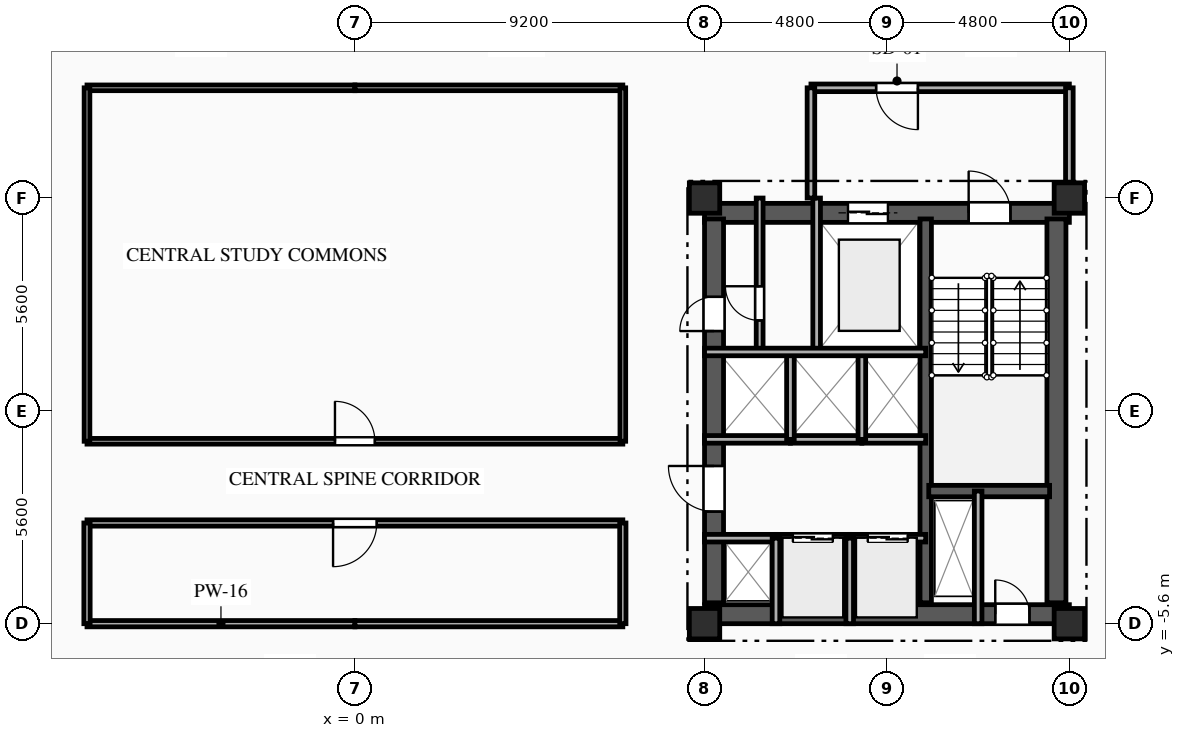
"""IFC4 building model, lengths in metres.
Left out: names, types, materials, properties, quantities, classifications, styles, units other than length and angle.
Written with IfcOpenShell. Run it as: python <this file> out.ifc"""

import sys

from ifc_helpers import new_model, si_unit, direction, frame, frame_2d, origin, origin_2d, place, context, subcontext, project, spatial, rectangle, extrude, element, fill, save


model = new_model("IFC4")
c1 = context("Model", 3, precision=1e-05, world=origin(), true_north=direction((0.0, 1.0)))
c2 = subcontext(c1, "Body", "Model", "MODEL_VIEW")
j1 = project(units=[si_unit("LENGTHUNIT", "METRE"), si_unit("PLANEANGLEUNIT", "RADIAN")], contexts=[c1])
p1 = place(None, origin())
s1 = spatial("IfcSite", under=j1, at=p1, CompositionType="ELEMENT")
p2 = place(p1, origin())
s2 = spatial("IfcBuilding", under=s1, at=p2, CompositionType="ELEMENT")
p3 = place(p2, frame((0.0, 0.0, 203.1)))
s3 = spatial("IfcBuildingStorey", under=s2, at=p3, CompositionType="ELEMENT", Elevation=203.1)
for number, where, z_axis, x_axis in (
    (1, (9.2, -5.6, 0.0), (0.0, 0.0, 1.0), (1.0, 0.0, 0.0)),
    (2, (9.2, 5.6, 0.0), (0.0, 0.0, 1.0), (1.0, 0.0, 0.0)),
    (3, (18.8, -5.6, 0.0), (0.0, 0.0, 1.0), (1.0, 0.0, 0.0)),
    (4, (18.8, 5.6, 0.0), (0.0, 0.0, 1.0), (1.0, 0.0, 0.0)),
):
    element("IfcColumn", number, at=place(p3, frame(where, z_axis=z_axis, x_axis=x_axis)), inside=s3, PredefinedType="COLUMN", context=c2, shape_type="SweptSolid", body=[
        extrude(rectangle(XDim=0.8, YDim=0.8, at=origin_2d()), origin(), (0.0, 0.0, 1.0), 3.35),
    ])
p4 = place(p3, frame((9.2, 5.21, 0.0), z_axis=(0.0, 0.0, 1.0), x_axis=(1.0, 0.0, 0.0)))
e5 = element("IfcWall", 5, at=p4, inside=s3, PredefinedType="SHEAR", context=c2, shape_type="SweptSolid", body=[
    extrude(rectangle(XDim=9.6, YDim=0.5, at=frame_2d((4.8, 0.0))), origin(), (0.0, 0.0, 1.0), 3.04),
])
p5 = place(p4, frame((6.95, 0.0, 0.0)))
e6 = element("IfcOpeningElement", 6, at=p5, cuts=e5, PredefinedType="OPENING", context=c2, shape_type="SweptSolid", body=[
    extrude(rectangle(XDim=1.1, YDim=2.15, at=frame_2d((0.55, 1.075))), frame((0.0, 0.26, 0.0), z_axis=(0.0, -1.0, 0.0), x_axis=(1.0, 0.0, 0.0)), (0.0, 0.0, 1.0), 0.52),
])
p6 = place(p4, frame((3.775, 0.0, 0.0)))
e7 = element("IfcOpeningElement", 7, at=p6, cuts=e5, PredefinedType="OPENING", context=c2, shape_type="SweptSolid", body=[
    extrude(rectangle(XDim=1.05, YDim=2.1, at=frame_2d((0.525, 1.05))), frame((0.0, 0.26, 0.0), z_axis=(0.0, -1.0, 0.0), x_axis=(1.0, 0.0, 0.0)), (0.0, 0.0, 1.0), 0.52),
])
p7 = place(p3, frame((9.2, -5.35, 0.0), z_axis=(0.0, 0.0, 1.0), x_axis=(1.0, 0.0, 0.0)))
e8 = element("IfcWall", 8, at=p7, inside=s3, PredefinedType="SHEAR", context=c2, shape_type="SweptSolid", body=[
    extrude(rectangle(XDim=9.6, YDim=0.5, at=frame_2d((4.8, 0.0))), origin(), (0.0, 0.0, 1.0), 3.04),
])
p8 = place(p7, frame((7.65, 0.0, 0.0)))
e9 = element("IfcOpeningElement", 9, at=p8, cuts=e8, PredefinedType="OPENING", context=c2, shape_type="SweptSolid", body=[
    extrude(rectangle(XDim=0.9, YDim=2.1, at=frame_2d((0.45, 1.05))), frame((0.0, 0.26, 0.0), z_axis=(0.0, -1.0, 0.0), x_axis=(1.0, 0.0, 0.0)), (0.0, 0.0, 1.0), 0.52),
])
p9 = place(p3, frame((9.45, -5.05, 0.0), z_axis=(0.0, 0.0, 1.0), x_axis=(0.0, 1.0, 0.0)))
e10 = element("IfcWall", 10, at=p9, inside=s3, PredefinedType="SHEAR", context=c2, shape_type="SweptSolid", body=[
    extrude(rectangle(XDim=10.1, YDim=0.5, at=frame_2d((5.05, 0.0))), origin(), (0.0, 0.0, 1.0), 3.04),
])
p10 = place(p9, frame((7.15, 0.0, 0.0)))
e11 = element("IfcOpeningElement", 11, at=p10, cuts=e10, PredefinedType="OPENING", context=c2, shape_type="SweptSolid", body=[
    extrude(rectangle(XDim=0.9, YDim=2.1, at=frame_2d((0.45, 1.05))), frame((0.0, 0.26, 0.0), z_axis=(0.0, -1.0, 0.0), x_axis=(1.0, 0.0, 0.0)), (0.0, 0.0, 1.0), 0.52),
])
p11 = place(p9, frame((2.4, 0.0, 0.0)))
e12 = element("IfcOpeningElement", 12, at=p11, cuts=e10, PredefinedType="OPENING", context=c2, shape_type="SweptSolid", body=[
    extrude(rectangle(XDim=1.2, YDim=2.15, at=frame_2d((0.6, 1.075))), frame((0.0, 0.26, 0.0), z_axis=(0.0, -1.0, 0.0), x_axis=(1.0, 0.0, 0.0)), (0.0, 0.0, 1.0), 0.52),
])
p12 = place(p3, frame((18.46, -5.05, 0.0), z_axis=(0.0, 0.0, 1.0), x_axis=(0.0, 1.0, 0.0)))
e13 = element("IfcWall", 13, at=p12, inside=s3, PredefinedType="SHEAR", context=c2, shape_type="SweptSolid", body=[
    extrude(rectangle(XDim=10.1, YDim=0.5, at=frame_2d((5.05, 0.0))), origin(), (0.0, 0.0, 1.0), 3.04),
])
p13 = place(p3, frame((15.02, -5.05, 0.0), z_axis=(0.0, 0.0, 1.0), x_axis=(0.0, 1.0, 0.0)))
e14 = element("IfcWall", 14, at=p13, inside=s3, PredefinedType="SHEAR", context=c2, shape_type="SweptSolid", body=[
    extrude(rectangle(XDim=10.1, YDim=0.3, at=frame_2d((5.05, 0.0))), origin(), (0.0, 0.0, 1.0), 3.04),
])
p14 = place(p3, frame((15.1, -2.11, 0.0), z_axis=(0.0, 0.0, 1.0), x_axis=(1.0, 0.0, 0.0)))
e15 = element("IfcWall", 15, at=p14, inside=s3, PredefinedType="SHEAR", context=c2, shape_type="SweptSolid", body=[
    extrude(rectangle(XDim=3.18, YDim=0.3, at=frame_2d((1.59, 0.0))), origin(), (0.0, 0.0, 1.0), 3.04),
])
p15 = place(p3, frame((16.4, -2.11, 0.0), z_axis=(0.0, 0.0, 1.0), x_axis=(0.0, -1.0, 0.0)))
e16 = element("IfcWall", 16, at=p15, inside=s3, PredefinedType="PARTITIONING", context=c2, shape_type="SweptSolid", body=[
    extrude(rectangle(XDim=3.49, YDim=0.2, at=frame_2d((1.745, 0.0))), origin(), (0.0, 0.0, 1.0), 3.04),
])
p16 = place(p3, frame((12.15, 5.6, 0.0), z_axis=(0.0, 0.0, 1.0), x_axis=(0.0, -1.0, 0.0)))
e17 = element("IfcWall", 17, at=p16, inside=s3, PredefinedType="PARTITIONING", context=c2, shape_type="SweptSolid", body=[
    extrude(rectangle(XDim=4.05, YDim=0.2, at=frame_2d((2.025, 0.0))), origin(), (0.0, 0.0, 1.0), 3.04),
])
p17 = place(p3, frame((18.8, 8.5, 0.0), z_axis=(0.0, 0.0, 1.0), x_axis=(-1.0, 0.0, 0.0)))
e18 = element("IfcWall", 18, at=p17, inside=s3, PredefinedType="PARTITIONING", context=c2, shape_type="SweptSolid", body=[
    extrude(rectangle(XDim=6.8, YDim=0.2, at=frame_2d((3.4, 0.0))), origin(), (0.0, 0.0, 1.0), 3.04),
])
p18 = place(p17, frame((3.985, 0.0, 0.0)))
e19 = element("IfcOpeningElement", 19, at=p18, cuts=e18, PredefinedType="OPENING", context=c2, shape_type="SweptSolid", body=[
    extrude(rectangle(XDim=1.1, YDim=2.15, at=frame_2d((0.55, 1.075))), frame((0.0, 0.11, 0.0), z_axis=(0.0, -1.0, 0.0), x_axis=(1.0, 0.0, 0.0)), (0.0, 0.0, 1.0), 0.22),
])
p19 = place(p3, frame((18.8, 5.6, 0.0), z_axis=(0.0, 0.0, 1.0), x_axis=(0.0, 1.0, 0.0)))
e20 = element("IfcWall", 20, at=p19, inside=s3, PredefinedType="PARTITIONING", context=c2, shape_type="SweptSolid", body=[
    extrude(rectangle(XDim=2.9, YDim=0.2, at=frame_2d((1.45, 0.0))), origin(), (0.0, 0.0, 1.0), 2.665),
])
p20 = place(p3, frame((12.0, 8.5, 0.0), z_axis=(0.0, 0.0, 1.0), x_axis=(0.0, -1.0, 0.0)))
e21 = element("IfcWall", 21, at=p20, inside=s3, PredefinedType="PARTITIONING", context=c2, shape_type="SweptSolid", body=[
    extrude(rectangle(XDim=2.9, YDim=0.2, at=frame_2d((1.45, 0.0))), origin(), (0.0, 0.0, 1.0), 3.04),
])
p21 = place(p3, frame((10.65, 1.55, 0.0), z_axis=(0.0, 0.0, 1.0), x_axis=(0.0, 1.0, 0.0)))
e22 = element("IfcWall", 22, at=p21, inside=s3, PredefinedType="PARTITIONING", context=c2, shape_type="SweptSolid", body=[
    extrude(rectangle(XDim=4.05, YDim=0.18, at=frame_2d((2.025, 0.0))), origin(), (0.0, 0.0, 1.0), 3.04),
])
p22 = place(p21, frame((0.829, 0.0, 0.0)))
e23 = element("IfcOpeningElement", 23, at=p22, cuts=e22, PredefinedType="OPENING", context=c2, shape_type="SweptSolid", body=[
    extrude(rectangle(XDim=0.9, YDim=2.1, at=frame_2d((0.45, 1.05))), frame((0.0, 0.1, 0.0), z_axis=(0.0, -1.0, 0.0), x_axis=(1.0, 0.0, 0.0)), (0.0, 0.0, 1.0), 0.2),
])
p23 = place(p3, frame((9.2, -3.35, 0.0), z_axis=(0.0, 0.0, 1.0), x_axis=(1.0, 0.0, 0.0)))
e24 = element("IfcWall", 24, at=p23, inside=s3, PredefinedType="PARTITIONING", context=c2, shape_type="SweptSolid", body=[
    extrude(rectangle(XDim=1.88, YDim=0.2, at=frame_2d((0.94, 0.0))), origin(), (0.0, 0.0, 1.0), 2.755),
])
p24 = place(p3, frame((11.08, -3.35, 0.0), z_axis=(0.0, 0.0, 1.0), x_axis=(1.0, 0.0, 0.0)))
e25 = element("IfcWall", 25, at=p24, inside=s3, PredefinedType="PARTITIONING", context=c2, shape_type="SweptSolid", body=[
    extrude(rectangle(XDim=1.94, YDim=0.2, at=frame_2d((0.97, 0.0))), origin(), (0.0, 0.0, 1.0), 3.04),
])
p25 = place(p24, frame((0.445, 0.0, 0.0)))
e26 = element("IfcOpeningElement", 26, at=p25, cuts=e25, PredefinedType="OPENING", context=c2, shape_type="SweptSolid", body=[
    extrude(rectangle(XDim=1.05, YDim=2.1, at=frame_2d((0.525, 1.05))), frame((0.0, 0.11, 0.0), z_axis=(0.0, -1.0, 0.0), x_axis=(1.0, 0.0, 0.0)), (0.0, 0.0, 1.0), 0.22),
])
p26 = place(p3, frame((13.02, -3.35, 0.0), z_axis=(0.0, 0.0, 1.0), x_axis=(1.0, 0.0, 0.0)))
e27 = element("IfcWall", 27, at=p26, inside=s3, PredefinedType="PARTITIONING", context=c2, shape_type="SweptSolid", body=[
    extrude(rectangle(XDim=2.0, YDim=0.2, at=frame_2d((1.0, 0.0))), origin(), (0.0, 0.0, 1.0), 3.04),
])
p27 = place(p26, frame((0.475, 0.0, 0.0)))
e28 = element("IfcOpeningElement", 28, at=p27, cuts=e27, PredefinedType="OPENING", context=c2, shape_type="SweptSolid", body=[
    extrude(rectangle(XDim=1.05, YDim=2.1, at=frame_2d((0.525, 1.05))), frame((0.0, 0.11, 0.0), z_axis=(0.0, -1.0, 0.0), x_axis=(1.0, 0.0, 0.0)), (0.0, 0.0, 1.0), 0.22),
])
p28 = place(p3, frame((11.46, -0.75, 0.0), z_axis=(0.0, 0.0, 1.0), x_axis=(-1.0, 0.0, 0.0)))
e29 = element("IfcWall", 29, at=p28, inside=s3, PredefinedType="PARTITIONING", context=c2, shape_type="SweptSolid", body=[
    extrude(rectangle(XDim=2.26, YDim=0.2, at=frame_2d((1.13, 0.0))), origin(), (0.0, 0.0, 1.0), 3.04),
])
p29 = place(p3, frame((13.34, -0.75, 0.0), z_axis=(0.0, 0.0, 1.0), x_axis=(-1.0, 0.0, 0.0)))
e30 = element("IfcWall", 30, at=p29, inside=s3, PredefinedType="PARTITIONING", context=c2, shape_type="SweptSolid", body=[
    extrude(rectangle(XDim=1.88, YDim=0.2, at=frame_2d((0.94, 0.0))), origin(), (0.0, 0.0, 1.0), 3.04),
])
p30 = place(p3, frame((15.02, -0.75, 0.0), z_axis=(0.0, 0.0, 1.0), x_axis=(-1.0, 0.0, 0.0)))
e31 = element("IfcWall", 31, at=p30, inside=s3, PredefinedType="PARTITIONING", context=c2, shape_type="SweptSolid", body=[
    extrude(rectangle(XDim=1.68, YDim=0.2, at=frame_2d((0.84, 0.0))), origin(), (0.0, 0.0, 1.0), 3.04),
])
for number, where, z_axis, x_axis in (
    (32, (11.08, -5.6, 0.0), (0.0, 0.0, 1.0), (0.0, 1.0, 0.0)),
    (33, (13.02, -5.6, 0.0), (0.0, 0.0, 1.0), (0.0, 1.0, 0.0)),
):
    element("IfcWall", number, at=place(p3, frame(where, z_axis=z_axis, x_axis=x_axis)), inside=s3, PredefinedType="PARTITIONING", context=c2, shape_type="SweptSolid", body=[
        extrude(rectangle(XDim=2.25, YDim=0.2, at=frame_2d((1.125, 0.0))), origin(), (0.0, 0.0, 1.0), 3.04),
    ])
for number, where, z_axis, x_axis in (
    (34, (11.46, -0.75, 0.0), (0.0, 0.0, 1.0), (0.0, 1.0, 0.0)),
    (35, (13.34, -0.75, 0.0), (0.0, 0.0, 1.0), (0.0, 1.0, 0.0)),
):
    element("IfcWall", number, at=place(p3, frame(where, z_axis=z_axis, x_axis=x_axis)), inside=s3, PredefinedType="PARTITIONING", context=c2, shape_type="SweptSolid", body=[
        extrude(rectangle(XDim=2.3, YDim=0.2, at=frame_2d((1.15, 0.0))), origin(), (0.0, 0.0, 1.0), 3.04),
    ])
for number, where, z_axis, x_axis in (
    (36, (0.0, 8.5, 0.0), (0.0, 0.0, 1.0), (-1.0, 0.0, 0.0)),
    (37, (7.05, 8.5, 0.0), (0.0, 0.0, 1.0), (-1.0, 0.0, 0.0)),
):
    element("IfcWall", number, at=place(p3, frame(where, z_axis=z_axis, x_axis=x_axis)), inside=s3, PredefinedType="PARTITIONING", context=c2, shape_type="SweptSolid", body=[
        extrude(rectangle(XDim=7.05, YDim=0.15, at=frame_2d((3.525, 0.0))), origin(), (0.0, 0.0, 1.0), 3.04),
    ])
for number, where, z_axis, x_axis in (
    (38, (-7.05, -5.6, 0.0), (0.0, 0.0, 1.0), (1.0, 0.0, 0.0)),
    (39, (0.0, -5.6, 0.0), (0.0, 0.0, 1.0), (1.0, 0.0, 0.0)),
):
    element("IfcWall", number, at=place(p3, frame(where, z_axis=z_axis, x_axis=x_axis)), inside=s3, PredefinedType="PARTITIONING", context=c2, shape_type="SweptSolid", body=[
        extrude(rectangle(XDim=7.05, YDim=0.165, at=frame_2d((3.525, 0.0))), origin(), (0.0, 0.0, 1.0), 2.525),
    ])
p31 = place(p3, frame((-7.05, -0.8, 0.0), z_axis=(0.0, 0.0, 1.0), x_axis=(1.0, 0.0, 0.0)))
e40 = element("IfcWall", 40, at=p31, inside=s3, PredefinedType="PARTITIONING", context=c2, shape_type="SweptSolid", body=[
    extrude(rectangle(XDim=14.1, YDim=0.15, at=frame_2d((7.05, 0.0))), origin(), (0.0, 0.0, 1.0), 3.04),
])
p32 = place(p31, frame((6.525, 0.0, 0.0)))
e41 = element("IfcOpeningElement", 41, at=p32, cuts=e40, PredefinedType="OPENING", context=c2, shape_type="SweptSolid", body=[
    extrude(rectangle(XDim=1.05, YDim=2.15, at=frame_2d((0.525, 1.075))), frame((0.0, 0.085, 0.0), z_axis=(0.0, -1.0, 0.0), x_axis=(1.0, 0.0, 0.0)), (0.0, 0.0, 1.0), 0.17),
])
p33 = place(p3, frame((7.05, -2.95, 0.0), z_axis=(0.0, 0.0, 1.0), x_axis=(-1.0, 0.0, 0.0)))
e42 = element("IfcWall", 42, at=p33, inside=s3, PredefinedType="PARTITIONING", context=c2, shape_type="SweptSolid", body=[
    extrude(rectangle(XDim=14.1, YDim=0.165, at=frame_2d((7.05, 0.0))), origin(), (0.0, 0.0, 1.0), 3.04),
])
p34 = place(p33, frame((6.475, 0.0, 0.0)))
e43 = element("IfcOpeningElement", 43, at=p34, cuts=e42, PredefinedType="OPENING", context=c2, shape_type="SweptSolid", body=[
    extrude(rectangle(XDim=1.15, YDim=2.15, at=frame_2d((0.575, 1.075))), frame((0.0, 0.093, 0.0), z_axis=(0.0, -1.0, 0.0), x_axis=(1.0, 0.0, 0.0)), (0.0, 0.0, 1.0), 0.185),
])
p35 = place(p3, frame((-7.05, 8.5, 0.0), z_axis=(0.0, 0.0, 1.0), x_axis=(0.0, -1.0, 0.0)))
e44 = element("IfcWall", 44, at=p35, inside=s3, PredefinedType="PARTITIONING", context=c2, shape_type="SweptSolid", body=[
    extrude(rectangle(XDim=9.3, YDim=0.15, at=frame_2d((4.65, 0.0))), origin(), (0.0, 0.0, 1.0), 3.04),
])
p36 = place(p3, frame((-7.05, -2.95, 0.0), z_axis=(0.0, 0.0, 1.0), x_axis=(0.0, -1.0, 0.0)))
e45 = element("IfcWall", 45, at=p36, inside=s3, PredefinedType="PARTITIONING", context=c2, shape_type="SweptSolid", body=[
    extrude(rectangle(XDim=2.65, YDim=0.165, at=frame_2d((1.325, 0.0))), origin(), (0.0, 0.0, 1.0), 3.04),
])
p37 = place(p3, frame((7.05, -0.8, 0.0), z_axis=(0.0, 0.0, 1.0), x_axis=(0.0, 1.0, 0.0)))
e46 = element("IfcWall", 46, at=p37, inside=s3, PredefinedType="PARTITIONING", context=c2, shape_type="SweptSolid", body=[
    extrude(rectangle(XDim=9.3, YDim=0.15, at=frame_2d((4.65, 0.0))), origin(), (0.0, 0.0, 1.0), 3.04),
])
p38 = place(p3, frame((7.05, -5.6, 0.0), z_axis=(0.0, 0.0, 1.0), x_axis=(0.0, 1.0, 0.0)))
e47 = element("IfcWall", 47, at=p38, inside=s3, PredefinedType="PARTITIONING", context=c2, shape_type="SweptSolid", body=[
    extrude(rectangle(XDim=2.65, YDim=0.165, at=frame_2d((1.325, 0.0))), origin(), (0.0, 0.0, 1.0), 3.04),
])
p39 = place(p3, frame((9.2, 1.55, 0.0), z_axis=(0.0, 0.0, 1.0), x_axis=(1.0, 0.0, 0.0)))
e48 = element("IfcWall", 48, at=p39, inside=s3, PredefinedType="PARTITIONING", context=c2, shape_type="SweptSolid", body=[
    extrude(rectangle(XDim=5.82, YDim=0.2, at=frame_2d((2.91, 0.0))), origin(), (0.0, 0.0, 1.0), 3.04),
])
p40 = place(p5, origin())
e49 = element("IfcDoor", 49, at=p40, inside=s3, OperationType="SINGLE_SWING_LEFT", PredefinedType="DOOR", context=c2, shape_type="SweptSolid", body=[
    extrude(rectangle(XDim=1.1, YDim=2.15, at=frame_2d((0.55, 1.075))), frame((0.0, 0.025, 0.0), z_axis=(0.0, -1.0, 0.0), x_axis=(1.0, 0.0, 0.0)), (0.0, 0.0, 1.0), 0.05),
])
fill(e6, e49)
p41 = place(p6, origin())
e50 = element("IfcDoor", 50, at=p41, inside=s3, OperationType="DOUBLE_DOOR_SLIDING", PredefinedType="DOOR", context=c2, shape_type="SweptSolid", body=[
    extrude(rectangle(XDim=1.05, YDim=2.1, at=frame_2d((0.525, 1.05))), frame((0.0, 0.025, 0.0), z_axis=(0.0, -1.0, 0.0), x_axis=(1.0, 0.0, 0.0)), (0.0, 0.0, 1.0), 0.05),
])
fill(e7, e50)
p42 = place(p8, origin())
e51 = element("IfcDoor", 51, at=p42, inside=s3, OperationType="SINGLE_SWING_LEFT", PredefinedType="DOOR", context=c2, shape_type="SweptSolid", body=[
    extrude(rectangle(XDim=0.9, YDim=2.1, at=frame_2d((0.45, 1.05))), frame((0.0, 0.025, 0.0), z_axis=(0.0, -1.0, 0.0), x_axis=(1.0, 0.0, 0.0)), (0.0, 0.0, 1.0), 0.05),
])
fill(e9, e51)
p43 = place(p18, origin())
e52 = element("IfcDoor", 52, at=p43, inside=s3, OperationType="SINGLE_SWING_LEFT", PredefinedType="DOOR", context=c2, shape_type="SweptSolid", body=[
    extrude(rectangle(XDim=1.1, YDim=2.15, at=frame_2d((0.55, 1.075))), frame((0.0, 0.025, 0.0), z_axis=(0.0, -1.0, 0.0), x_axis=(1.0, 0.0, 0.0)), (0.0, 0.0, 1.0), 0.05),
])
fill(e19, e52)
p44 = place(p22, origin())
e53 = element("IfcDoor", 53, at=p44, inside=s3, OperationType="SINGLE_SWING_RIGHT", PredefinedType="DOOR", context=c2, shape_type="SweptSolid", body=[
    extrude(rectangle(XDim=0.9, YDim=2.1, at=frame_2d((0.45, 1.05))), frame((0.0, 0.025, 0.0), z_axis=(0.0, -1.0, 0.0), x_axis=(1.0, 0.0, 0.0)), (0.0, 0.0, 1.0), 0.05),
])
fill(e23, e53)
p45 = place(p10, origin())
e54 = element("IfcDoor", 54, at=p45, inside=s3, OperationType="SINGLE_SWING_LEFT", PredefinedType="DOOR", context=c2, shape_type="SweptSolid", body=[
    extrude(rectangle(XDim=0.9, YDim=2.1, at=frame_2d((0.45, 1.05))), frame((0.0, 0.025, 0.0), z_axis=(0.0, -1.0, 0.0), x_axis=(1.0, 0.0, 0.0)), (0.0, 0.0, 1.0), 0.05),
])
fill(e11, e54)
p46 = place(p25, origin())
e55 = element("IfcDoor", 55, at=p46, inside=s3, OperationType="DOUBLE_DOOR_SLIDING", PredefinedType="DOOR", context=c2, shape_type="SweptSolid", body=[
    extrude(rectangle(XDim=1.05, YDim=2.1, at=frame_2d((0.525, 1.05))), frame((0.0, 0.025, 0.0), z_axis=(0.0, -1.0, 0.0), x_axis=(1.0, 0.0, 0.0)), (0.0, 0.0, 1.0), 0.05),
])
fill(e26, e55)
p47 = place(p27, origin())
e56 = element("IfcDoor", 56, at=p47, inside=s3, OperationType="DOUBLE_DOOR_SLIDING", PredefinedType="DOOR", context=c2, shape_type="SweptSolid", body=[
    extrude(rectangle(XDim=1.05, YDim=2.1, at=frame_2d((0.525, 1.05))), frame((0.0, 0.025, 0.0), z_axis=(0.0, -1.0, 0.0), x_axis=(1.0, 0.0, 0.0)), (0.0, 0.0, 1.0), 0.05),
])
fill(e28, e56)
p48 = place(p11, origin())
e57 = element("IfcDoor", 57, at=p48, inside=s3, OperationType="SINGLE_SWING_RIGHT", PredefinedType="DOOR", context=c2, shape_type="SweptSolid", body=[
    extrude(rectangle(XDim=1.2, YDim=2.15, at=frame_2d((0.6, 1.075))), frame((0.0, 0.025, 0.0), z_axis=(0.0, -1.0, 0.0), x_axis=(1.0, 0.0, 0.0)), (0.0, 0.0, 1.0), 0.05),
])
fill(e12, e57)
p49 = place(p32, origin())
e58 = element("IfcDoor", 58, at=p49, inside=s3, OperationType="SINGLE_SWING_LEFT", PredefinedType="DOOR", context=c2, shape_type="SweptSolid", body=[
    extrude(rectangle(XDim=1.05, YDim=2.15, at=frame_2d((0.525, 1.075))), frame((0.0, 0.025, 0.0), z_axis=(0.0, -1.0, 0.0), x_axis=(1.0, 0.0, 0.0)), (0.0, 0.0, 1.0), 0.05),
])
fill(e41, e58)
p50 = place(p34, origin())
e59 = element("IfcDoor", 59, at=p50, inside=s3, OperationType="SINGLE_SWING_RIGHT", PredefinedType="DOOR", context=c2, shape_type="SweptSolid", body=[
    extrude(rectangle(XDim=1.15, YDim=2.15, at=frame_2d((0.575, 1.075))), frame((0.0, 0.025, 0.0), z_axis=(0.0, -1.0, 0.0), x_axis=(1.0, 0.0, 0.0)), (0.0, 0.0, 1.0), 0.05),
])
fill(e43, e59)
save(model, sys.argv[1])
